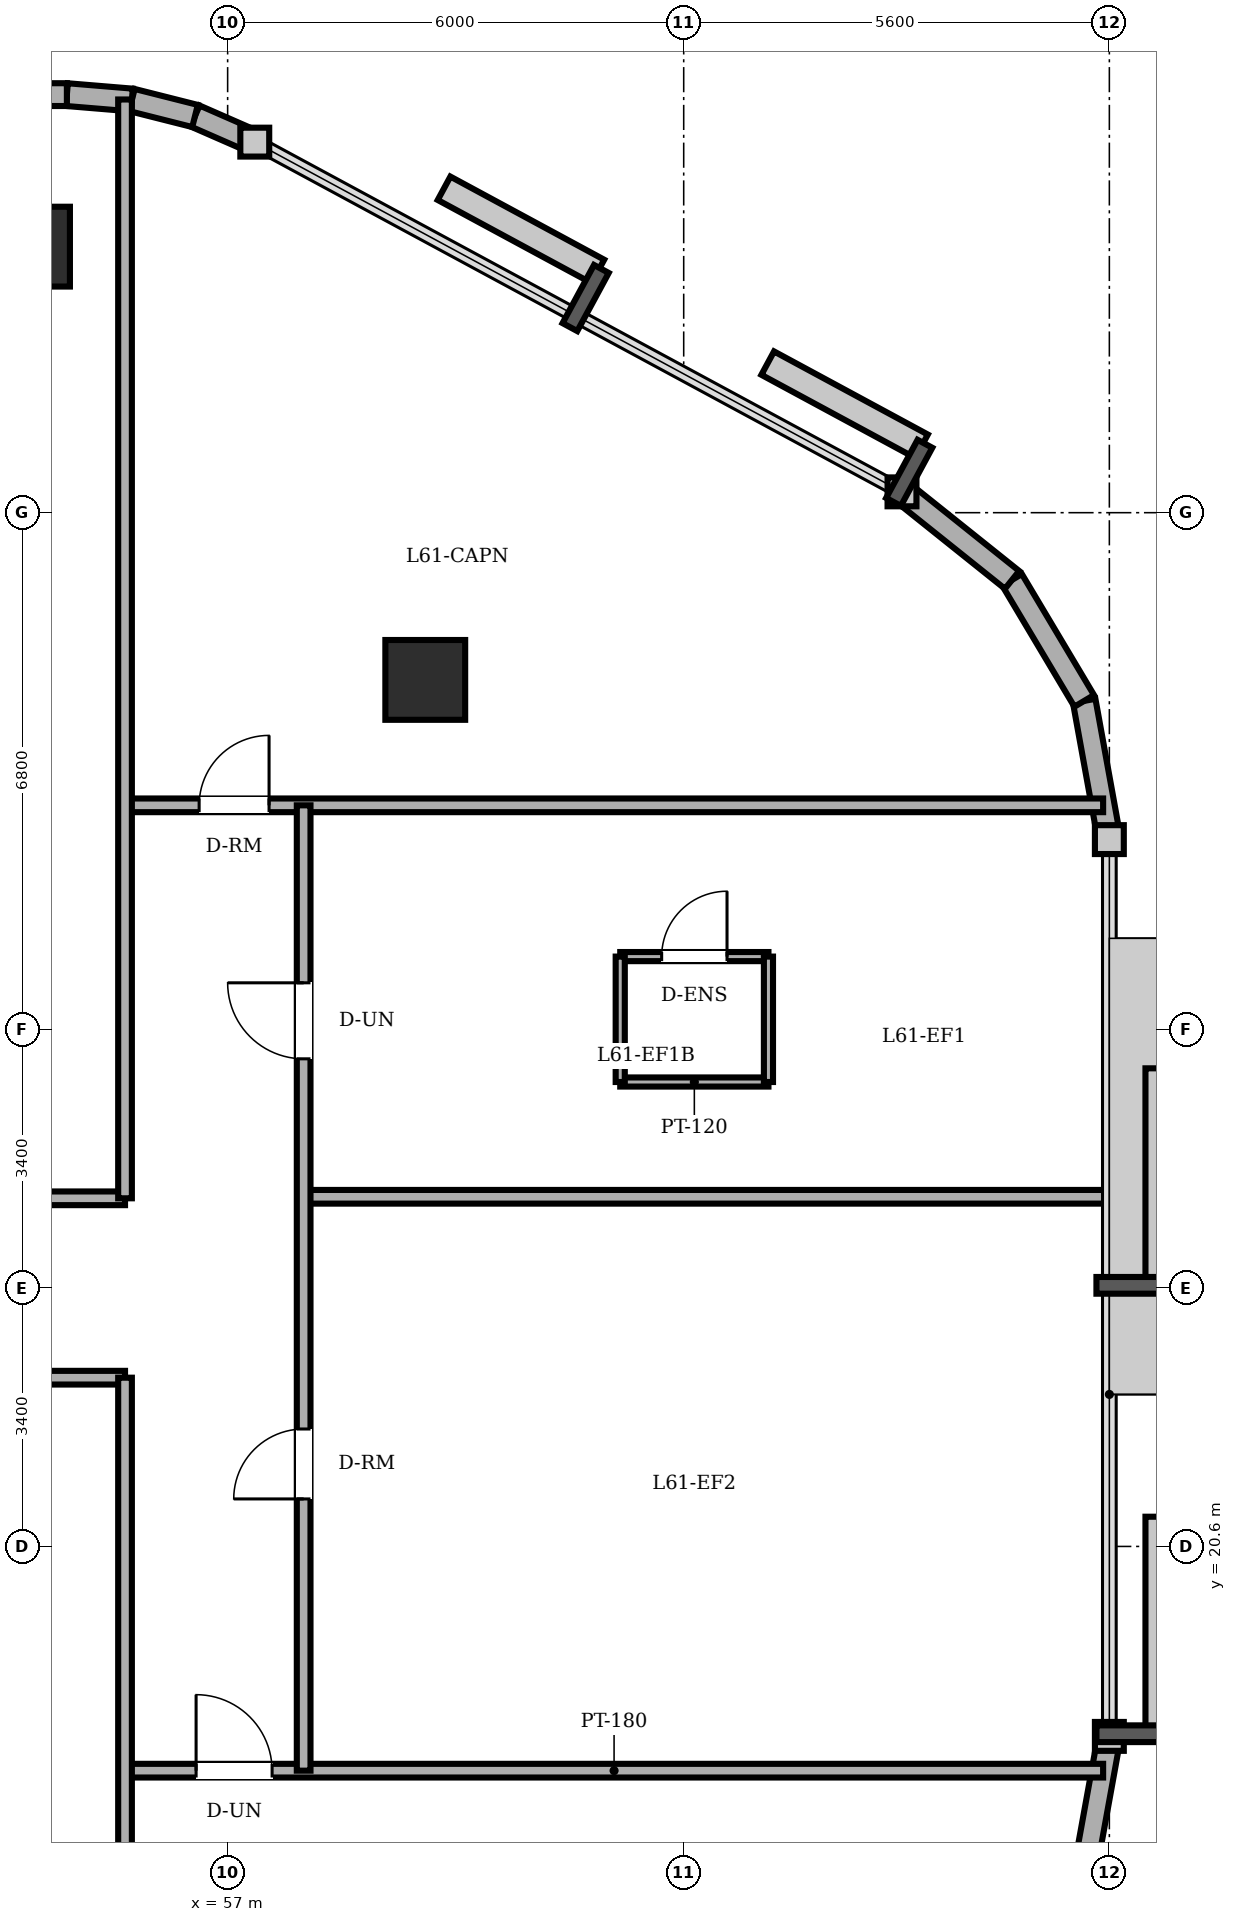
"""IFC4 building model, lengths in metres.
Left out: names, types, materials, properties, quantities, classifications, styles, units other than length and angle.
Written with IfcOpenShell. Run it as: python <this file> out.ifc"""

import sys

from ifc_helpers import new_model, si_unit, direction, frame, frame_2d, origin, origin_2d, place, context, subcontext, project, spatial, rectangle, circle, extrude, element, fill, save


model = new_model("IFC4")
c1 = context("Model", 3, precision=1e-05, world=origin(), true_north=direction((0.0, 1.0)))
c2 = subcontext(c1, "Body", "Model", "MODEL_VIEW")
j1 = project(units=[si_unit("LENGTHUNIT", "METRE"), si_unit("PLANEANGLEUNIT", "RADIAN")], contexts=[c1])
p1 = place(None, origin())
s1 = spatial("IfcSite", under=j1, at=p1, CompositionType="ELEMENT")
p2 = place(p1, origin())
s2 = spatial("IfcBuilding", under=s1, at=p2, CompositionType="ELEMENT")
p3 = place(p2, frame((0.0, 0.0, 233.7)))
s3 = spatial("IfcBuildingStorey", under=s2, at=p3, CompositionType="ELEMENT", Elevation=233.7)
for number, where, z_axis, x_axis in (
    (1, (59.6, 32.0, 0.0), (0.0, 0.0, 1.0), (1.0, 0.0, 0.0)),
    (2, (54.4, 37.7, 0.0), (0.0, 0.0, 1.0), (1.0, 0.0, 0.0)),
):
    element("IfcColumn", number, at=place(p3, frame(where, z_axis=z_axis, x_axis=x_axis)), inside=s3, PredefinedType="COLUMN", context=c2, shape_type="SweptSolid", body=[
        extrude(circle(Radius=0.525, at=origin_2d()), origin(), (0.0, 0.0, 1.0), 3.6),
    ])
for number, where, z_axis, x_axis in (
    (3, (68.269, 16.276, 0.0), (0.0, 0.0, 1.0), (0.178, 0.984, 0.0)),
    (4, (68.6, 29.899, 0.0), (0.0, 0.0, 1.0), (-0.178, 0.984, 0.0)),
):
    element("IfcWall", number, at=place(p3, frame(where, z_axis=z_axis, x_axis=x_axis)), inside=s3, PredefinedType="SOLIDWALL", context=c2, shape_type="SweptSolid", body=[
        extrude(rectangle(XDim=1.855, YDim=0.3, at=frame_2d((0.927, 0.0))), origin(), (0.0, 0.0, 1.0), 3.4),
    ])
p4 = place(p3, frame((68.269, 31.724, 0.0), z_axis=(0.0, 0.0, 1.0), x_axis=(-0.512072018927, 0.858942516955, 0.0)))
e5 = element("IfcWall", 5, at=p4, inside=s3, PredefinedType="SOLIDWALL", context=c2, shape_type="SweptSolid", body=[
    extrude(rectangle(XDim=1.853, YDim=0.3, at=frame_2d((0.927, 0.0))), origin(), (0.0, 0.0, 1.0), 3.4),
])
p5 = place(p3, frame((67.32, 33.316, 0.0), z_axis=(0.0, 0.0, 1.0), x_axis=(-0.780920189257, 0.624630817372, 0.0)))
e6 = element("IfcWall", 6, at=p5, inside=s3, PredefinedType="SOLIDWALL", context=c2, shape_type="SweptSolid", body=[
    extrude(rectangle(XDim=1.854, YDim=0.3, at=frame_2d((0.927, 0.0))), origin(), (0.0, 0.0, 1.0), 3.4),
])
p6 = place(p3, frame((57.357, 39.075, 0.0), z_axis=(0.0, 0.0, 1.0), x_axis=(-0.916085473636, 0.400983048261, 0.0)))
e7 = element("IfcWall", 7, at=p6, inside=s3, PredefinedType="SOLIDWALL", context=c2, shape_type="SweptSolid", body=[
    extrude(rectangle(XDim=0.858, YDim=0.3, at=frame_2d((0.429, 0.0))), origin(), (0.0, 0.0, 1.0), 3.4),
])
p7 = place(p3, frame((56.571, 39.419, 0.0), z_axis=(0.0, 0.0, 1.0), x_axis=(-0.969536346338, 0.244947490555, 0.0)))
e8 = element("IfcWall", 8, at=p7, inside=s3, PredefinedType="SOLIDWALL", context=c2, shape_type="SweptSolid", body=[
    extrude(rectangle(XDim=0.857, YDim=0.3, at=frame_2d((0.429, 0.0))), origin(), (0.0, 0.0, 1.0), 3.4),
])
p8 = place(p3, frame((55.74, 39.629, 0.0), z_axis=(0.0, 0.0, 1.0), x_axis=(-0.996565355958, 0.082809971041, 0.0)))
e9 = element("IfcWall", 9, at=p8, inside=s3, PredefinedType="SOLIDWALL", context=c2, shape_type="SweptSolid", body=[
    extrude(rectangle(XDim=0.858, YDim=0.3, at=frame_2d((0.429, 0.0))), origin(), (0.0, 0.0, 1.0), 3.4),
])
p9 = place(p3, frame((54.885, 39.7, 0.0), z_axis=(0.0, 0.0, 1.0), x_axis=(-1.0, 0.0, 0.0)))
e10 = element("IfcWall", 10, at=p9, inside=s3, PredefinedType="SOLIDWALL", context=c2, shape_type="SweptSolid", body=[
    extrude(rectangle(XDim=32.485, YDim=0.3, at=frame_2d((16.243, 0.0))), origin(), (0.0, 0.0, 1.0), 3.4),
])
p10 = place(p9, frame((27.685, 0.0, 0.0)))
e11 = element("IfcOpeningElement", 11, at=p10, cuts=e10, PredefinedType="OPENING", context=c2, shape_type="SweptSolid", body=[
    extrude(rectangle(XDim=0.95, YDim=2.2, at=frame_2d((0.475, 1.1))), frame((0.0, 0.16, 0.0), z_axis=(0.0, -1.0, 0.0), x_axis=(1.0, 0.0, 0.0)), (0.0, 0.0, 1.0), 0.32),
])
p11 = place(p9, frame((4.57, 0.0, 0.85)))
e12 = element("IfcOpeningElement", 12, at=p11, cuts=e10, PredefinedType="OPENING", context=c2, shape_type="SweptSolid", body=[
    extrude(rectangle(XDim=1.35, YDim=1.55, at=frame_2d((0.675, 0.775))), frame((0.0, 0.16, 0.0), z_axis=(0.0, -1.0, 0.0), x_axis=(1.0, 0.0, 0.0)), (0.0, 0.0, 1.0), 0.32),
])
p12 = place(p9, frame((9.465, 0.0, 0.85)))
e13 = element("IfcOpeningElement", 13, at=p12, cuts=e10, PredefinedType="OPENING", context=c2, shape_type="SweptSolid", body=[
    extrude(rectangle(XDim=1.35, YDim=1.55, at=frame_2d((0.675, 0.775))), frame((0.0, 0.16, 0.0), z_axis=(0.0, -1.0, 0.0), x_axis=(1.0, 0.0, 0.0)), (0.0, 0.0, 1.0), 0.32),
])
p13 = place(p9, frame((16.577, 0.0, 0.85)))
e14 = element("IfcOpeningElement", 14, at=p13, cuts=e10, PredefinedType="OPENING", context=c2, shape_type="SweptSolid", body=[
    extrude(rectangle(XDim=1.35, YDim=1.55, at=frame_2d((0.675, 0.775))), frame((0.0, 0.16, 0.0), z_axis=(0.0, -1.0, 0.0), x_axis=(1.0, 0.0, 0.0)), (0.0, 0.0, 1.0), 0.32),
])
p14 = place(p9, frame((18.793, 0.0, 0.85)))
e15 = element("IfcOpeningElement", 15, at=p14, cuts=e10, PredefinedType="OPENING", context=c2, shape_type="SweptSolid", body=[
    extrude(rectangle(XDim=1.35, YDim=1.55, at=frame_2d((0.675, 0.775))), frame((0.0, 0.16, 0.0), z_axis=(0.0, -1.0, 0.0), x_axis=(1.0, 0.0, 0.0)), (0.0, 0.0, 1.0), 0.32),
])
p15 = place(p9, frame((22.91, 0.0, 0.85)))
e16 = element("IfcOpeningElement", 16, at=p15, cuts=e10, PredefinedType="OPENING", context=c2, shape_type="SweptSolid", body=[
    extrude(rectangle(XDim=1.35, YDim=1.55, at=frame_2d((0.675, 0.775))), frame((0.0, 0.16, 0.0), z_axis=(0.0, -1.0, 0.0), x_axis=(1.0, 0.0, 0.0)), (0.0, 0.0, 1.0), 0.32),
])
p16 = place(p9, frame((29.835, 0.0, 0.85)))
e17 = element("IfcOpeningElement", 17, at=p16, cuts=e10, PredefinedType="OPENING", context=c2, shape_type="SweptSolid", body=[
    extrude(rectangle(XDim=1.35, YDim=1.55, at=frame_2d((0.675, 0.775))), frame((0.0, 0.16, 0.0), z_axis=(0.0, -1.0, 0.0), x_axis=(1.0, 0.0, 0.0)), (0.0, 0.0, 1.0), 0.32),
])
p17 = place(p3, frame((62.165, 28.36, 0.0), z_axis=(0.0, 0.0, 1.0), x_axis=(1.0, 0.0, 0.0)))
e18 = element("IfcWall", 18, at=p17, inside=s3, PredefinedType="PARTITIONING", context=c2, shape_type="SweptSolid", body=[
    extrude(rectangle(XDim=1.95, YDim=0.12, at=frame_2d((0.975, 0.0))), origin(), (0.0, 0.0, 1.0), 3.4),
])
p18 = place(p17, frame((0.545, 0.0, 0.0)))
e19 = element("IfcOpeningElement", 19, at=p18, cuts=e18, PredefinedType="OPENING", context=c2, shape_type="SweptSolid", body=[
    extrude(rectangle(XDim=0.86, YDim=2.1, at=frame_2d((0.43, 1.05))), frame((0.0, 0.07, 0.0), z_axis=(0.0, -1.0, 0.0), x_axis=(1.0, 0.0, 0.0)), (0.0, 0.0, 1.0), 0.14),
])
p19 = place(p3, frame((64.115, 26.71, 0.0), z_axis=(0.0, 0.0, 1.0), x_axis=(-1.0, 0.0, 0.0)))
e20 = element("IfcWall", 20, at=p19, inside=s3, PredefinedType="PARTITIONING", context=c2, shape_type="SweptSolid", body=[
    extrude(rectangle(XDim=1.95, YDim=0.12, at=frame_2d((0.975, 0.0))), origin(), (0.0, 0.0, 1.0), 3.4),
])
for number, where, z_axis, x_axis in (
    (21, (62.165, 28.36, 0.0), (0.0, 0.0, 1.0), (0.0, -1.0, 0.0)),
    (22, (64.115, 26.71, 0.0), (0.0, 0.0, 1.0), (0.0, 1.0, 0.0)),
):
    element("IfcWall", number, at=place(p3, frame(where, z_axis=z_axis, x_axis=x_axis)), inside=s3, PredefinedType="PARTITIONING", context=c2, shape_type="SweptSolid", body=[
        extrude(rectangle(XDim=1.65, YDim=0.12, at=frame_2d((0.825, 0.0))), origin(), (0.0, 0.0, 1.0), 3.4),
    ])
p20 = place(p3, frame((55.65, 17.65, 0.0), z_axis=(0.0, 0.0, 1.0), x_axis=(1.0, 0.0, 0.0)))
e23 = element("IfcWall", 23, at=p20, inside=s3, PredefinedType="PARTITIONING", context=c2, shape_type="SweptSolid", body=[
    extrude(rectangle(XDim=12.868, YDim=0.18, at=frame_2d((6.434, 0.0))), origin(), (0.0, 0.0, 1.0), 3.4),
])
p21 = place(p20, frame((0.935, 0.0, 0.0)))
e24 = element("IfcOpeningElement", 24, at=p21, cuts=e23, PredefinedType="OPENING", context=c2, shape_type="SweptSolid", body=[
    extrude(rectangle(XDim=1.0, YDim=2.15, at=frame_2d((0.5, 1.075))), frame((0.0, 0.1, 0.0), z_axis=(0.0, -1.0, 0.0), x_axis=(1.0, 0.0, 0.0)), (0.0, 0.0, 1.0), 0.2),
])
p22 = place(p3, frame((39.85, 22.82, 0.0), z_axis=(0.0, 0.0, 1.0), x_axis=(1.0, 0.0, 0.0)))
e25 = element("IfcWall", 25, at=p22, inside=s3, PredefinedType="PARTITIONING", context=c2, shape_type="SweptSolid", body=[
    extrude(rectangle(XDim=15.8, YDim=0.18, at=frame_2d((7.9, 0.0))), origin(), (0.0, 0.0, 1.0), 3.4),
])
p23 = place(p22, frame((7.44, 0.0, 0.0)))
e26 = element("IfcOpeningElement", 26, at=p23, cuts=e25, PredefinedType="OPENING", context=c2, shape_type="SweptSolid", body=[
    extrude(rectangle(XDim=0.92, YDim=2.1, at=frame_2d((0.46, 1.05))), frame((0.0, 0.1, 0.0), z_axis=(0.0, -1.0, 0.0), x_axis=(1.0, 0.0, 0.0)), (0.0, 0.0, 1.0), 0.2),
])
p24 = place(p3, frame((39.85, 25.18, 0.0), z_axis=(0.0, 0.0, 1.0), x_axis=(1.0, 0.0, 0.0)))
e27 = element("IfcWall", 27, at=p24, inside=s3, PredefinedType="PARTITIONING", context=c2, shape_type="SweptSolid", body=[
    extrude(rectangle(XDim=15.8, YDim=0.18, at=frame_2d((7.9, 0.0))), origin(), (0.0, 0.0, 1.0), 3.4),
])
p25 = place(p24, frame((7.44, 0.0, 0.0)))
e28 = element("IfcOpeningElement", 28, at=p25, cuts=e27, PredefinedType="OPENING", context=c2, shape_type="SweptSolid", body=[
    extrude(rectangle(XDim=0.92, YDim=2.1, at=frame_2d((0.46, 1.05))), frame((0.0, 0.1, 0.0), z_axis=(0.0, -1.0, 0.0), x_axis=(1.0, 0.0, 0.0)), (0.0, 0.0, 1.0), 0.2),
])
p26 = place(p3, frame((58.0, 25.2, 0.0), z_axis=(0.0, 0.0, 1.0), x_axis=(1.0, 0.0, 0.0)))
e29 = element("IfcWall", 29, at=p26, inside=s3, PredefinedType="PARTITIONING", context=c2, shape_type="SweptSolid", body=[
    extrude(rectangle(XDim=10.6, YDim=0.18, at=frame_2d((5.3, 0.0))), origin(), (0.0, 0.0, 1.0), 3.4),
])
p27 = place(p3, frame((55.65, 30.35, 0.0), z_axis=(0.0, 0.0, 1.0), x_axis=(1.0, 0.0, 0.0)))
e30 = element("IfcWall", 30, at=p27, inside=s3, PredefinedType="PARTITIONING", context=c2, shape_type="SweptSolid", body=[
    extrude(rectangle(XDim=12.868, YDim=0.18, at=frame_2d((6.434, 0.0))), origin(), (0.0, 0.0, 1.0), 3.4),
])
p28 = place(p27, frame((0.975, 0.0, 0.0)))
e31 = element("IfcOpeningElement", 31, at=p28, cuts=e30, PredefinedType="OPENING", context=c2, shape_type="SweptSolid", body=[
    extrude(rectangle(XDim=0.92, YDim=2.1, at=frame_2d((0.46, 1.05))), frame((0.0, 0.1, 0.0), z_axis=(0.0, -1.0, 0.0), x_axis=(1.0, 0.0, 0.0)), (0.0, 0.0, 1.0), 0.2),
])
for number, where, z_axis, x_axis in (
    (32, (55.65, 8.364, 0.0), (0.0, 0.0, 1.0), (0.0, 1.0, 0.0)),
    (33, (55.65, 25.18, 0.0), (0.0, 0.0, 1.0), (0.0, 1.0, 0.0)),
):
    element("IfcWall", number, at=place(p3, frame(where, z_axis=z_axis, x_axis=x_axis)), inside=s3, PredefinedType="PARTITIONING", context=c2, shape_type="SweptSolid", body=[
        extrude(rectangle(XDim=14.456, YDim=0.18, at=frame_2d((7.228, 0.0))), origin(), (0.0, 0.0, 1.0), 3.4),
    ])
p29 = place(p3, frame((58.0, 17.65, 0.0), z_axis=(0.0, 0.0, 1.0), x_axis=(0.0, 1.0, 0.0)))
e34 = element("IfcWall", 34, at=p29, inside=s3, PredefinedType="PARTITIONING", context=c2, shape_type="SweptSolid", body=[
    extrude(rectangle(XDim=12.7, YDim=0.18, at=frame_2d((6.35, 0.0))), origin(), (0.0, 0.0, 1.0), 3.4),
])
p30 = place(p29, frame((9.365, 0.0, 0.0)))
e35 = element("IfcOpeningElement", 35, at=p30, cuts=e34, PredefinedType="OPENING", context=c2, shape_type="SweptSolid", body=[
    extrude(rectangle(XDim=1.0, YDim=2.15, at=frame_2d((0.5, 1.075))), frame((0.0, 0.1, 0.0), z_axis=(0.0, -1.0, 0.0), x_axis=(1.0, 0.0, 0.0)), (0.0, 0.0, 1.0), 0.2),
])
p31 = place(p29, frame((3.575, 0.0, 0.0)))
e36 = element("IfcOpeningElement", 36, at=p31, cuts=e34, PredefinedType="OPENING", context=c2, shape_type="SweptSolid", body=[
    extrude(rectangle(XDim=0.92, YDim=2.1, at=frame_2d((0.46, 1.05))), frame((0.0, 0.1, 0.0), z_axis=(0.0, -1.0, 0.0), x_axis=(1.0, 0.0, 0.0)), (0.0, 0.0, 1.0), 0.2),
])
p32 = place(p18, origin())
e37 = element("IfcDoor", 37, at=p32, inside=s3, OperationType="SINGLE_SWING_RIGHT", PredefinedType="DOOR", context=c2, shape_type="SweptSolid", body=[
    extrude(rectangle(XDim=0.86, YDim=2.1, at=frame_2d((0.43, 1.05))), frame((0.0, 0.025, 0.0), z_axis=(0.0, -1.0, 0.0), x_axis=(1.0, 0.0, 0.0)), (0.0, 0.0, 1.0), 0.05),
])
fill(e19, e37)
p33 = place(p28, origin())
e38 = element("IfcDoor", 38, at=p33, inside=s3, OperationType="SINGLE_SWING_RIGHT", PredefinedType="DOOR", context=c2, shape_type="SweptSolid", body=[
    extrude(rectangle(XDim=0.92, YDim=2.1, at=frame_2d((0.46, 1.05))), frame((0.0, 0.025, 0.0), z_axis=(0.0, -1.0, 0.0), x_axis=(1.0, 0.0, 0.0)), (0.0, 0.0, 1.0), 0.05),
])
fill(e31, e38)
p34 = place(p21, origin())
e39 = element("IfcDoor", 39, at=p34, inside=s3, OperationType="SINGLE_SWING_LEFT", PredefinedType="DOOR", context=c2, shape_type="SweptSolid", body=[
    extrude(rectangle(XDim=1.0, YDim=2.15, at=frame_2d((0.5, 1.075))), frame((0.0, 0.025, 0.0), z_axis=(0.0, -1.0, 0.0), x_axis=(1.0, 0.0, 0.0)), (0.0, 0.0, 1.0), 0.05),
])
fill(e24, e39)
p35 = place(p30, origin())
e40 = element("IfcDoor", 40, at=p35, inside=s3, OperationType="SINGLE_SWING_RIGHT", PredefinedType="DOOR", context=c2, shape_type="SweptSolid", body=[
    extrude(rectangle(XDim=1.0, YDim=2.15, at=frame_2d((0.5, 1.075))), frame((0.0, 0.025, 0.0), z_axis=(0.0, -1.0, 0.0), x_axis=(1.0, 0.0, 0.0)), (0.0, 0.0, 1.0), 0.05),
])
fill(e35, e40)
p36 = place(p31, origin())
e41 = element("IfcDoor", 41, at=p36, inside=s3, OperationType="SINGLE_SWING_LEFT", PredefinedType="DOOR", context=c2, shape_type="SweptSolid", body=[
    extrude(rectangle(XDim=0.92, YDim=2.1, at=frame_2d((0.46, 1.05))), frame((0.0, 0.025, 0.0), z_axis=(0.0, -1.0, 0.0), x_axis=(1.0, 0.0, 0.0)), (0.0, 0.0, 1.0), 0.05),
])
fill(e36, e41)
save(model, sys.argv[1])
